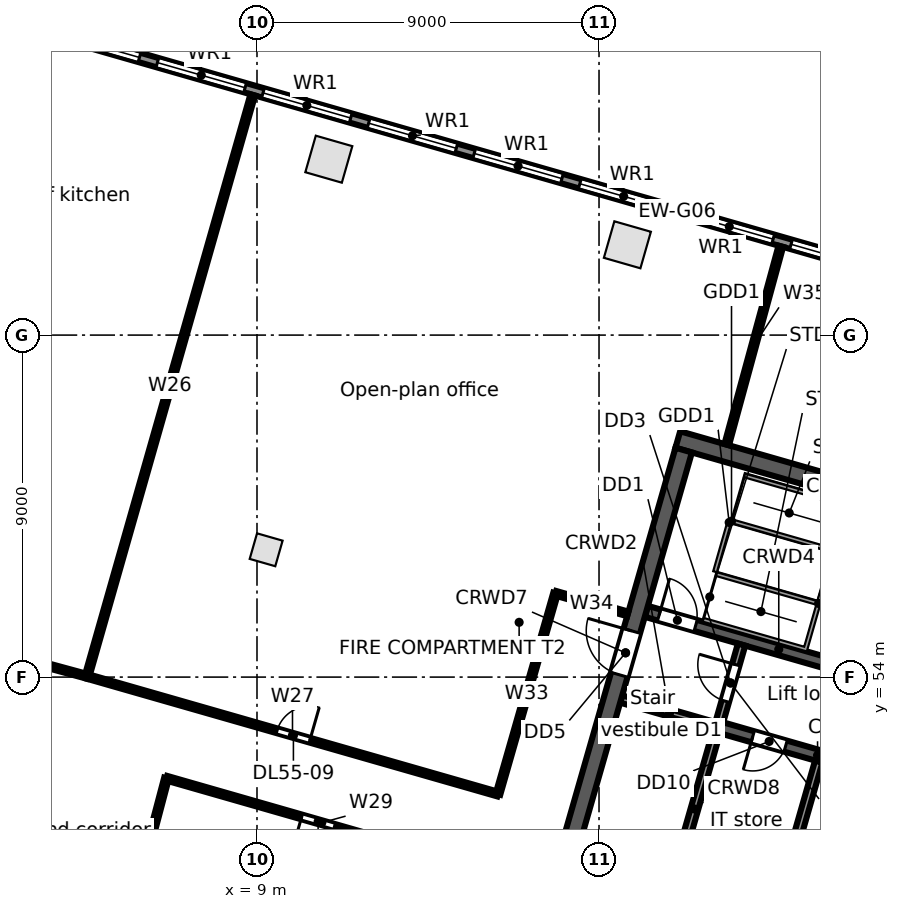
"""IFC4 building model, lengths in metres.
Left out: names, types, materials, properties, quantities, classifications, styles, units other than length and angle.
Written with IfcOpenShell. Run it as: python <this file> out.ifc"""

import sys

from ifc_helpers import new_model, si_unit, direction, frame, frame_2d, origin, origin_2d, place, context, subcontext, project, spatial, rectangle, extrude, element, fill, save


model = new_model("IFC4")
c1 = context("Model", 3, precision=1e-05, world=origin(), true_north=direction((0.0, 1.0)))
c2 = subcontext(c1, "Body", "Model", "MODEL_VIEW")
j1 = project(units=[si_unit("LENGTHUNIT", "METRE"), si_unit("PLANEANGLEUNIT", "RADIAN")], contexts=[c1])
p1 = place(None, origin())
s1 = spatial("IfcSite", under=j1, at=p1, CompositionType="ELEMENT")
p2 = place(p1, origin())
s2 = spatial("IfcBuilding", under=s1, at=p2, CompositionType="ELEMENT")
p3 = place(p2, frame((0.0, 0.0, 254.3)))
s3 = spatial("IfcBuildingStorey", under=s2, at=p3, CompositionType="ELEMENT", Elevation=254.3)
for number, where, z_axis, x_axis in (
    (1, (18.746, 65.376, 0.0), (0.0, 0.0, 1.0), (-0.961, 0.276, 0.0)),
    (2, (10.89, 67.629, 0.0), (0.0, 0.0, 1.0), (-0.961, 0.276, 0.0)),
):
    element("IfcColumn", number, at=place(p3, frame(where, z_axis=z_axis, x_axis=x_axis)), inside=s3, PredefinedType="COLUMN", context=c2, shape_type="SweptSolid", body=[
        extrude(rectangle(XDim=1.0, YDim=1.0, at=origin_2d()), origin(), (0.0, 0.0, 1.0), 3.9),
    ])
p4 = place(p3, frame((9.241, 57.35, 0.0), z_axis=(0.0, 0.0, 1.0), x_axis=(0.961261695938, -0.275637355817, 0.0)))
e3 = element("IfcColumn", 3, at=p4, inside=s3, PredefinedType="COLUMN", context=c2, shape_type="SweptSolid", body=[
    extrude(rectangle(XDim=0.7, YDim=0.7, at=origin_2d()), origin(), (0.0, 0.0, 1.0), 3.9),
])
p5 = place(p3, frame((3.34, 71.042, 0.0), z_axis=(0.0, 0.0, 1.0), x_axis=(0.96126179431, -0.275637012753, 0.0)))
e4 = element("IfcWall", 4, at=p5, inside=s3, PredefinedType="STANDARD", context=c2, shape_type="SweptSolid", body=[
    extrude(rectangle(XDim=34.779, YDim=0.25, at=frame_2d((17.39, 0.0))), origin(), (0.0, 0.0, 1.0), 3.55),
])
p6 = place(p5, frame((32.071, 0.0, 0.8)))
e5 = element("IfcOpeningElement", 5, at=p6, cuts=e4, PredefinedType="OPENING", context=c2, shape_type="SweptSolid", body=[
    extrude(rectangle(XDim=2.4, YDim=2.2, at=frame_2d((1.2, 1.1))), frame((0.0, 0.135, 0.0), z_axis=(0.0, -1.0, 0.0), x_axis=(1.0, 0.0, 0.0)), (0.0, 0.0, 1.0), 0.27),
])
p7 = place(p5, frame((29.18, 0.0, 0.8)))
e6 = element("IfcOpeningElement", 6, at=p7, cuts=e4, PredefinedType="OPENING", context=c2, shape_type="SweptSolid", body=[
    extrude(rectangle(XDim=2.4, YDim=2.2, at=frame_2d((1.2, 1.1))), frame((0.0, 0.135, 0.0), z_axis=(0.0, -1.0, 0.0), x_axis=(1.0, 0.0, 0.0)), (0.0, 0.0, 1.0), 0.27),
])
p8 = place(p5, frame((26.289, 0.0, 0.8)))
e7 = element("IfcOpeningElement", 7, at=p8, cuts=e4, PredefinedType="OPENING", context=c2, shape_type="SweptSolid", body=[
    extrude(rectangle(XDim=2.4, YDim=2.2, at=frame_2d((1.2, 1.1))), frame((0.0, 0.135, 0.0), z_axis=(0.0, -1.0, 0.0), x_axis=(1.0, 0.0, 0.0)), (0.0, 0.0, 1.0), 0.27),
])
p9 = place(p5, frame((23.398, 0.0, 0.8)))
e8 = element("IfcOpeningElement", 8, at=p9, cuts=e4, PredefinedType="OPENING", context=c2, shape_type="SweptSolid", body=[
    extrude(rectangle(XDim=2.4, YDim=2.2, at=frame_2d((1.2, 1.1))), frame((0.0, 0.135, 0.0), z_axis=(0.0, -1.0, 0.0), x_axis=(1.0, 0.0, 0.0)), (0.0, 0.0, 1.0), 0.27),
])
p10 = place(p5, frame((20.508, 0.0, 0.8)))
e9 = element("IfcOpeningElement", 9, at=p10, cuts=e4, PredefinedType="OPENING", context=c2, shape_type="SweptSolid", body=[
    extrude(rectangle(XDim=2.4, YDim=2.2, at=frame_2d((1.2, 1.1))), frame((0.0, 0.135, 0.0), z_axis=(0.0, -1.0, 0.0), x_axis=(1.0, 0.0, 0.0)), (0.0, 0.0, 1.0), 0.27),
])
p11 = place(p5, frame((17.616, 0.0, 0.8)))
e10 = element("IfcOpeningElement", 10, at=p11, cuts=e4, PredefinedType="OPENING", context=c2, shape_type="SweptSolid", body=[
    extrude(rectangle(XDim=2.4, YDim=2.2, at=frame_2d((1.2, 1.1))), frame((0.0, 0.135, 0.0), z_axis=(0.0, -1.0, 0.0), x_axis=(1.0, 0.0, 0.0)), (0.0, 0.0, 1.0), 0.27),
])
p12 = place(p5, frame((14.726, 0.0, 0.8)))
e11 = element("IfcOpeningElement", 11, at=p12, cuts=e4, PredefinedType="OPENING", context=c2, shape_type="SweptSolid", body=[
    extrude(rectangle(XDim=2.4, YDim=2.2, at=frame_2d((1.2, 1.1))), frame((0.0, 0.135, 0.0), z_axis=(0.0, -1.0, 0.0), x_axis=(1.0, 0.0, 0.0)), (0.0, 0.0, 1.0), 0.27),
])
p13 = place(p5, frame((11.834, 0.0, 0.8)))
e12 = element("IfcOpeningElement", 12, at=p13, cuts=e4, PredefinedType="OPENING", context=c2, shape_type="SweptSolid", body=[
    extrude(rectangle(XDim=2.4, YDim=2.2, at=frame_2d((1.2, 1.1))), frame((0.0, 0.135, 0.0), z_axis=(0.0, -1.0, 0.0), x_axis=(1.0, 0.0, 0.0)), (0.0, 0.0, 1.0), 0.27),
])
p14 = place(p5, frame((8.944, 0.0, 0.8)))
e13 = element("IfcOpeningElement", 13, at=p14, cuts=e4, PredefinedType="OPENING", context=c2, shape_type="SweptSolid", body=[
    extrude(rectangle(XDim=2.4, YDim=2.2, at=frame_2d((1.2, 1.1))), frame((0.0, 0.135, 0.0), z_axis=(0.0, -1.0, 0.0), x_axis=(1.0, 0.0, 0.0)), (0.0, 0.0, 1.0), 0.27),
])
p15 = place(p5, frame((6.052, 0.0, 0.8)))
e14 = element("IfcOpeningElement", 14, at=p15, cuts=e4, PredefinedType="OPENING", context=c2, shape_type="SweptSolid", body=[
    extrude(rectangle(XDim=2.4, YDim=2.2, at=frame_2d((1.2, 1.1))), frame((0.0, 0.135, 0.0), z_axis=(0.0, -1.0, 0.0), x_axis=(1.0, 0.0, 0.0)), (0.0, 0.0, 1.0), 0.27),
])
p16 = place(p5, frame((3.162, 0.0, 0.8)))
e15 = element("IfcOpeningElement", 15, at=p16, cuts=e4, PredefinedType="OPENING", context=c2, shape_type="SweptSolid", body=[
    extrude(rectangle(XDim=2.4, YDim=2.2, at=frame_2d((1.2, 1.1))), frame((0.0, 0.135, 0.0), z_axis=(0.0, -1.0, 0.0), x_axis=(1.0, 0.0, 0.0)), (0.0, 0.0, 1.0), 0.27),
])
p17 = place(p5, frame((0.271, 0.0, 0.8)))
e16 = element("IfcOpeningElement", 16, at=p17, cuts=e4, PredefinedType="OPENING", context=c2, shape_type="SweptSolid", body=[
    extrude(rectangle(XDim=2.4, YDim=2.2, at=frame_2d((1.2, 1.1))), frame((0.0, 0.135, 0.0), z_axis=(0.0, -1.0, 0.0), x_axis=(1.0, 0.0, 0.0)), (0.0, 0.0, 1.0), 0.27),
])
p18 = place(p3, frame((18.583, 53.423, 0.0), z_axis=(0.0, 0.0, 1.0), x_axis=(0.961259287968, -0.275645753268, 0.0)))
e17 = element("IfcWall", 17, at=p18, inside=s3, PredefinedType="SOLIDWALL", context=c2, shape_type="SweptSolid", body=[
    extrude(rectangle(XDim=2.65, YDim=0.2, at=frame_2d((1.325, 0.0))), origin(), (0.0, 0.0, 1.0), 3.55),
])
p19 = place(p3, frame((21.131, 52.692, 0.0), z_axis=(0.0, 0.0, 1.0), x_axis=(0.961261488075, -0.275638080722, 0.0)))
e18 = element("IfcWall", 18, at=p19, inside=s3, PredefinedType="SOLIDWALL", context=c2, shape_type="SweptSolid", body=[
    extrude(rectangle(XDim=5.45, YDim=0.3, at=frame_2d((2.725, 0.0))), origin(), (0.0, 0.0, 1.0), 3.55),
])
p20 = place(p19, frame((0.95, 0.0, 0.0)))
e19 = element("IfcOpeningElement", 19, at=p20, cuts=e18, PredefinedType="OPENING", context=c2, shape_type="SweptSolid", body=[
    extrude(rectangle(XDim=0.9, YDim=2.1, at=frame_2d((0.45, 1.05))), frame((0.0, 0.16, 0.0), z_axis=(0.0, -1.0, 0.0), x_axis=(1.0, 0.0, 0.0)), (0.0, 0.0, 1.0), 0.32),
])
p21 = place(p19, frame((3.75, 0.0, 0.0)))
e20 = element("IfcOpeningElement", 20, at=p21, cuts=e18, PredefinedType="OPENING", context=c2, shape_type="SweptSolid", body=[
    extrude(rectangle(XDim=0.9, YDim=2.1, at=frame_2d((0.45, 1.05))), frame((0.0, 0.16, 0.0), z_axis=(0.0, -1.0, 0.0), x_axis=(1.0, 0.0, 0.0)), (0.0, 0.0, 1.0), 0.32),
])
p22 = place(p3, frame((19.245, 55.73, 0.0), z_axis=(0.0, 0.0, 1.0), x_axis=(0.961263007877, -0.275632780503, 0.0)))
e21 = element("IfcWall", 21, at=p22, inside=s3, PredefinedType="SOLIDWALL", context=c2, shape_type="SweptSolid", body=[
    extrude(rectangle(XDim=7.25, YDim=0.3, at=frame_2d((3.625, 0.0))), origin(), (0.0, 0.0, 1.0), 3.55),
])
p23 = place(p22, frame((0.35, 0.0, 0.0)))
e22 = element("IfcOpeningElement", 22, at=p23, cuts=e21, PredefinedType="OPENING", context=c2, shape_type="SweptSolid", body=[
    extrude(rectangle(XDim=1.0, YDim=2.1, at=frame_2d((0.5, 1.05))), frame((0.0, 0.16, 0.0), z_axis=(0.0, -1.0, 0.0), x_axis=(1.0, 0.0, 0.0)), (0.0, 0.0, 1.0), 0.32),
])
p24 = place(p3, frame((20.073, 60.252, 0.0), z_axis=(0.0, 0.0, 1.0), x_axis=(0.96126248289, -0.275634611374, 0.0)))
e23 = element("IfcWall", 23, at=p24, inside=s3, PredefinedType="SOLIDWALL", context=c2, shape_type="SweptSolid", body=[
    extrude(rectangle(XDim=9.0, YDim=0.45, at=frame_2d((4.5, 0.0))), origin(), (0.0, 0.0, 1.0), 3.55),
])
p25 = place(p3, frame((17.168, 49.303, 0.0), z_axis=(0.0, 0.0, 1.0), x_axis=(0.275638974822, 0.961261231695, 0.0)))
e24 = element("IfcWall", 24, at=p25, inside=s3, PredefinedType="SOLIDWALL", context=c2, shape_type="SweptSolid", body=[
    extrude(rectangle(XDim=11.1, YDim=0.45, at=frame_2d((5.55, 0.0))), origin(), (0.0, 0.0, 1.0), 3.55),
])
p26 = place(p25, frame((4.95, 0.0, 0.0)))
e25 = element("IfcOpeningElement", 25, at=p26, cuts=e24, PredefinedType="OPENING", context=c2, shape_type="SweptSolid", body=[
    extrude(rectangle(XDim=1.2, YDim=2.1, at=frame_2d((0.6, 1.05))), frame((0.0, 0.235, 0.0), z_axis=(0.0, -1.0, 0.0), x_axis=(1.0, 0.0, 0.0)), (0.0, 0.0, 1.0), 0.47),
])
p27 = place(p3, frame((19.932, 48.511, 0.0), z_axis=(0.0, 0.0, 1.0), x_axis=(0.275642273411, 0.961260285827, 0.0)))
e26 = element("IfcWall", 26, at=p27, inside=s3, PredefinedType="SOLIDWALL", context=c2, shape_type="SweptSolid", body=[
    extrude(rectangle(XDim=4.2, YDim=0.2, at=frame_2d((2.1, 0.0))), origin(), (0.0, 0.0, 1.0), 3.55),
])
p28 = place(p3, frame((21.172, 52.837, 0.0), z_axis=(0.0, 0.0, 1.0), x_axis=(0.275657676022, 0.961255868981, 0.0)))
e27 = element("IfcWall", 27, at=p28, inside=s3, PredefinedType="PARTITIONING", context=c2, shape_type="SweptSolid", body=[
    extrude(rectangle(XDim=2.1, YDim=0.2, at=frame_2d((1.05, 0.0))), origin(), (0.0, 0.0, 1.0), 3.55),
])
p29 = place(p28, frame((0.55, 0.0, 0.0)))
e28 = element("IfcOpeningElement", 28, at=p29, cuts=e27, PredefinedType="OPENING", context=c2, shape_type="SweptSolid", body=[
    extrude(rectangle(XDim=1.0, YDim=2.1, at=frame_2d((0.5, 1.05))), frame((0.0, 0.11, 0.0), z_axis=(0.0, -1.0, 0.0), x_axis=(1.0, 0.0, 0.0)), (0.0, 0.0, 1.0), 0.22),
])
p30 = place(p3, frame((22.623, 47.739, 0.0), z_axis=(0.0, 0.0, 1.0), x_axis=(0.275642273411, 0.961260285827, 0.0)))
e29 = element("IfcWall", 29, at=p30, inside=s3, PredefinedType="PARTITIONING", context=c2, shape_type="SweptSolid", body=[
    extrude(rectangle(XDim=4.2, YDim=0.2, at=frame_2d((2.1, 0.0))), origin(), (0.0, 0.0, 1.0), 3.55),
])
p31 = place(p3, frame((0.0, 55.25, 0.0), z_axis=(0.0, 0.0, 1.0), x_axis=(0.965016778836, -0.262188132005, 0.0)))
e30 = element("IfcWall", 30, at=p31, inside=s3, PredefinedType="PARTITIONING", context=c2, shape_type="SweptSolid", body=[
    extrude(rectangle(XDim=4.691, YDim=0.125, at=frame_2d((2.346, 0.0))), origin(), (0.0, 0.0, 1.0), 3.55),
])
p32 = place(p31, frame((1.95, 0.0, 0.0)))
e31 = element("IfcOpeningElement", 31, at=p32, cuts=e30, PredefinedType="OPENING", context=c2, shape_type="SweptSolid", body=[
    extrude(rectangle(XDim=0.9, YDim=2.1, at=frame_2d((0.45, 1.05))), frame((0.0, 0.073, 0.0), z_axis=(0.0, -1.0, 0.0), x_axis=(1.0, 0.0, 0.0)), (0.0, 0.0, 1.0), 0.145),
])
p33 = place(p3, frame((4.527, 54.02, 0.0), z_axis=(0.0, 0.0, 1.0), x_axis=(0.274088747086, 0.961704402985, 0.0)))
e32 = element("IfcWall", 32, at=p33, inside=s3, PredefinedType="PARTITIONING", context=c2, shape_type="SweptSolid", body=[
    extrude(rectangle(XDim=15.91, YDim=0.125, at=frame_2d((7.955, 0.0))), origin(), (0.0, 0.0, 1.0), 2.618),
])
p34 = place(p3, frame((4.527, 54.02, 0.0), z_axis=(0.0, 0.0, 1.0), x_axis=(0.961279520283, -0.275575187352, 0.0)))
e33 = element("IfcWall", 33, at=p34, inside=s3, PredefinedType="PARTITIONING", context=c2, shape_type="SweptSolid", body=[
    extrude(rectangle(XDim=11.25, YDim=0.125, at=frame_2d((5.625, 0.0))), origin(), (0.0, 0.0, 1.0), 2.618),
])
p35 = place(p34, frame((5.2, 0.0, 0.0)))
e34 = element("IfcOpeningElement", 34, at=p35, cuts=e33, PredefinedType="OPENING", context=c2, shape_type="SweptSolid", body=[
    extrude(rectangle(XDim=0.9, YDim=2.1, at=frame_2d((0.45, 1.05))), frame((0.0, 0.073, 0.0), z_axis=(0.0, -1.0, 0.0), x_axis=(1.0, 0.0, 0.0)), (0.0, 0.0, 1.0), 0.145),
])
p36 = place(p3, frame((5.364, 46.592, 0.0), z_axis=(0.0, 0.0, 1.0), x_axis=(0.255520885185, 0.966803536006, 0.0)))
e35 = element("IfcWall", 35, at=p36, inside=s3, PredefinedType="PARTITIONING", context=c2, shape_type="SweptSolid", body=[
    extrude(rectangle(XDim=4.911, YDim=0.125, at=frame_2d((2.456, 0.0))), origin(), (0.0, 0.0, 1.0), 2.73),
])
p37 = place(p3, frame((6.619, 51.34, 0.0), z_axis=(0.0, 0.0, 1.0), x_axis=(0.961262314742, -0.275635197782, 0.0)))
e36 = element("IfcWall", 36, at=p37, inside=s3, PredefinedType="PARTITIONING", context=c2, shape_type="SweptSolid", body=[
    extrude(rectangle(XDim=8.5, YDim=0.125, at=frame_2d((4.25, 0.0))), origin(), (0.0, 0.0, 1.0), 2.618),
])
p38 = place(p37, frame((3.7, 0.0, 0.0)))
e37 = element("IfcOpeningElement", 37, at=p38, cuts=e36, PredefinedType="OPENING", context=c2, shape_type="SweptSolid", body=[
    extrude(rectangle(XDim=0.9, YDim=2.1, at=frame_2d((0.45, 1.05))), frame((0.0, 0.073, 0.0), z_axis=(0.0, -1.0, 0.0), x_axis=(1.0, 0.0, 0.0)), (0.0, 0.0, 1.0), 0.145),
])
p39 = place(p3, frame((15.341, 50.92, 0.0), z_axis=(0.0, 0.0, 1.0), x_axis=(0.275653309838, 0.961257121053, 0.0)))
e38 = element("IfcWall", 38, at=p39, inside=s3, PredefinedType="PARTITIONING", context=c2, shape_type="SweptSolid", body=[
    extrude(rectangle(XDim=5.499, YDim=0.125, at=frame_2d((2.75, 0.0))), origin(), (0.0, 0.0, 1.0), 2.618),
])
p40 = place(p3, frame((16.857, 56.206, 0.0), z_axis=(0.0, 0.0, 1.0), x_axis=(0.961383985066, -0.275210525341, 0.0)))
e39 = element("IfcWall", 39, at=p40, inside=s3, PredefinedType="PARTITIONING", context=c2, shape_type="SweptSolid", body=[
    extrude(rectangle(XDim=1.977, YDim=0.125, at=frame_2d((0.988, 0.0))), origin(), (0.0, 0.0, 1.0), 3.55),
])
p41 = place(p3, frame((21.36, 60.117, 0.0), z_axis=(0.0, 0.0, 1.0), x_axis=(0.263151767798, 0.964754449124, 0.0)))
e40 = element("IfcWall", 40, at=p41, inside=s3, PredefinedType="PARTITIONING", context=c2, shape_type="SweptSolid", body=[
    extrude(rectangle(XDim=5.411, YDim=0.125, at=frame_2d((2.705, 0.0))), origin(), (0.0, 0.0, 1.0), 2.73),
])
p42 = place(p10, origin())
e41 = element("IfcWindow", 41, at=p42, inside=s3, PartitioningType="SINGLE_PANEL", PredefinedType="WINDOW", context=c2, shape_type="SweptSolid", body=[
    extrude(rectangle(XDim=2.4, YDim=2.2, at=frame_2d((1.2, 1.1))), frame((0.0, 0.03, 0.0), z_axis=(0.0, -1.0, 0.0), x_axis=(1.0, 0.0, 0.0)), (0.0, 0.0, 1.0), 0.06),
])
fill(e9, e41)
p43 = place(p11, origin())
e42 = element("IfcWindow", 42, at=p43, inside=s3, PartitioningType="SINGLE_PANEL", PredefinedType="WINDOW", context=c2, shape_type="SweptSolid", body=[
    extrude(rectangle(XDim=2.4, YDim=2.2, at=frame_2d((1.2, 1.1))), frame((0.0, 0.03, 0.0), z_axis=(0.0, -1.0, 0.0), x_axis=(1.0, 0.0, 0.0)), (0.0, 0.0, 1.0), 0.06),
])
fill(e10, e42)
p44 = place(p12, origin())
e43 = element("IfcWindow", 43, at=p44, inside=s3, PartitioningType="SINGLE_PANEL", PredefinedType="WINDOW", context=c2, shape_type="SweptSolid", body=[
    extrude(rectangle(XDim=2.4, YDim=2.2, at=frame_2d((1.2, 1.1))), frame((0.0, 0.03, 0.0), z_axis=(0.0, -1.0, 0.0), x_axis=(1.0, 0.0, 0.0)), (0.0, 0.0, 1.0), 0.06),
])
fill(e11, e43)
p45 = place(p13, origin())
e44 = element("IfcWindow", 44, at=p45, inside=s3, PartitioningType="SINGLE_PANEL", PredefinedType="WINDOW", context=c2, shape_type="SweptSolid", body=[
    extrude(rectangle(XDim=2.4, YDim=2.2, at=frame_2d((1.2, 1.1))), frame((0.0, 0.03, 0.0), z_axis=(0.0, -1.0, 0.0), x_axis=(1.0, 0.0, 0.0)), (0.0, 0.0, 1.0), 0.06),
])
fill(e12, e44)
p46 = place(p14, origin())
e45 = element("IfcWindow", 45, at=p46, inside=s3, PartitioningType="SINGLE_PANEL", PredefinedType="WINDOW", context=c2, shape_type="SweptSolid", body=[
    extrude(rectangle(XDim=2.4, YDim=2.2, at=frame_2d((1.2, 1.1))), frame((0.0, 0.03, 0.0), z_axis=(0.0, -1.0, 0.0), x_axis=(1.0, 0.0, 0.0)), (0.0, 0.0, 1.0), 0.06),
])
fill(e13, e45)
p47 = place(p15, origin())
e46 = element("IfcWindow", 46, at=p47, inside=s3, PartitioningType="SINGLE_PANEL", PredefinedType="WINDOW", context=c2, shape_type="SweptSolid", body=[
    extrude(rectangle(XDim=2.4, YDim=2.2, at=frame_2d((1.2, 1.1))), frame((0.0, 0.03, 0.0), z_axis=(0.0, -1.0, 0.0), x_axis=(1.0, 0.0, 0.0)), (0.0, 0.0, 1.0), 0.06),
])
fill(e14, e46)
p48 = place(p16, origin())
e47 = element("IfcWindow", 47, at=p48, inside=s3, PartitioningType="SINGLE_PANEL", PredefinedType="WINDOW", context=c2, shape_type="SweptSolid", body=[
    extrude(rectangle(XDim=2.4, YDim=2.2, at=frame_2d((1.2, 1.1))), frame((0.0, 0.03, 0.0), z_axis=(0.0, -1.0, 0.0), x_axis=(1.0, 0.0, 0.0)), (0.0, 0.0, 1.0), 0.06),
])
fill(e15, e47)
p49 = place(p17, origin())
e48 = element("IfcWindow", 48, at=p49, inside=s3, PartitioningType="SINGLE_PANEL", PredefinedType="WINDOW", context=c2, shape_type="SweptSolid", body=[
    extrude(rectangle(XDim=2.4, YDim=2.2, at=frame_2d((1.2, 1.1))), frame((0.0, 0.03, 0.0), z_axis=(0.0, -1.0, 0.0), x_axis=(1.0, 0.0, 0.0)), (0.0, 0.0, 1.0), 0.06),
])
fill(e16, e48)
p50 = place(p23, origin())
e49 = element("IfcDoor", 49, at=p50, inside=s3, OperationType="SINGLE_SWING_LEFT", PredefinedType="DOOR", context=c2, shape_type="SweptSolid", body=[
    extrude(rectangle(XDim=1.0, YDim=2.1, at=frame_2d((0.5, 1.05))), frame((0.0, 0.025, 0.0), z_axis=(0.0, -1.0, 0.0), x_axis=(1.0, 0.0, 0.0)), (0.0, 0.0, 1.0), 0.05),
])
fill(e22, e49)
p51 = place(p29, origin())
e50 = element("IfcDoor", 50, at=p51, inside=s3, OperationType="SINGLE_SWING_RIGHT", PredefinedType="DOOR", context=c2, shape_type="SweptSolid", body=[
    extrude(rectangle(XDim=1.0, YDim=2.1, at=frame_2d((0.5, 1.05))), frame((0.0, 0.025, 0.0), z_axis=(0.0, -1.0, 0.0), x_axis=(1.0, 0.0, 0.0)), (0.0, 0.0, 1.0), 0.05),
])
fill(e28, e50)
p52 = place(p26, origin())
e51 = element("IfcDoor", 51, at=p52, inside=s3, OperationType="SINGLE_SWING_RIGHT", PredefinedType="DOOR", context=c2, shape_type="SweptSolid", body=[
    extrude(rectangle(XDim=1.2, YDim=2.1, at=frame_2d((0.6, 1.05))), frame((0.0, 0.025, 0.0), z_axis=(0.0, -1.0, 0.0), x_axis=(1.0, 0.0, 0.0)), (0.0, 0.0, 1.0), 0.05),
])
fill(e25, e51)
p53 = place(p20, frame((0.9, 0.0, 0.0), z_axis=(0.0, 0.0, 1.0), x_axis=(-1.0, 0.0, 0.0)))
e52 = element("IfcDoor", 52, at=p53, inside=s3, OperationType="SINGLE_SWING_RIGHT", PredefinedType="DOOR", context=c2, shape_type="SweptSolid", body=[
    extrude(rectangle(XDim=0.9, YDim=2.1, at=frame_2d((0.45, 1.05))), frame((0.0, 0.025, 0.0), z_axis=(0.0, -1.0, 0.0), x_axis=(1.0, 0.0, 0.0)), (0.0, 0.0, 1.0), 0.05),
])
fill(e19, e52)
p54 = place(p35, origin())
e53 = element("IfcDoor", 53, at=p54, inside=s3, OperationType="SINGLE_SWING_RIGHT", PredefinedType="DOOR", context=c2, shape_type="SweptSolid", body=[
    extrude(rectangle(XDim=0.9, YDim=2.1, at=frame_2d((0.45, 1.05))), frame((0.0, 0.025, 0.0), z_axis=(0.0, -1.0, 0.0), x_axis=(1.0, 0.0, 0.0)), (0.0, 0.0, 1.0), 0.05),
])
fill(e34, e53)
p55 = place(p38, frame((0.9, 0.0, 0.0), z_axis=(0.0, 0.0, 1.0), x_axis=(-1.0, 0.0, 0.0)))
e54 = element("IfcDoor", 54, at=p55, inside=s3, OperationType="SINGLE_SWING_RIGHT", PredefinedType="DOOR", context=c2, shape_type="SweptSolid", body=[
    extrude(rectangle(XDim=0.9, YDim=2.1, at=frame_2d((0.45, 1.05))), frame((0.0, 0.025, 0.0), z_axis=(0.0, -1.0, 0.0), x_axis=(1.0, 0.0, 0.0)), (0.0, 0.0, 1.0), 0.05),
])
fill(e37, e54)
save(model, sys.argv[1])
